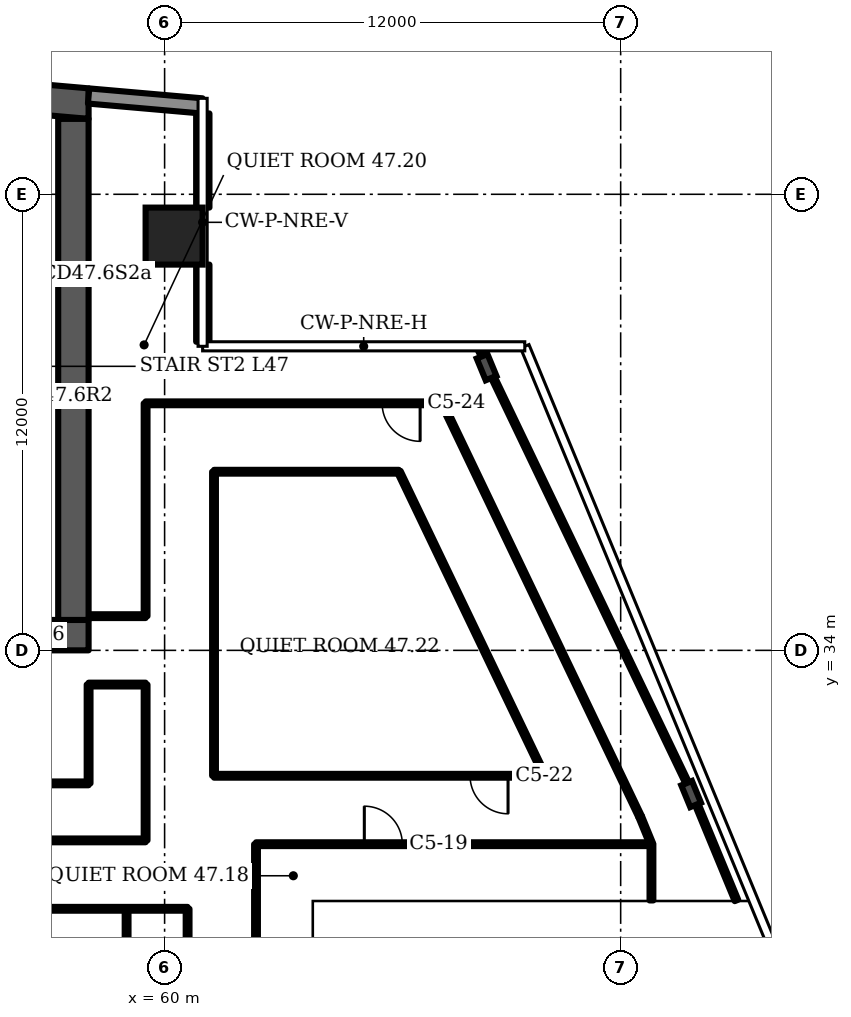
"""IFC4 building model, lengths in metres.
Left out: names, types, materials, properties, quantities, classifications, styles, units other than length and angle.
Written with IfcOpenShell. Run it as: python <this file> out.ifc"""

import sys

from ifc_helpers import new_model, si_unit, direction, frame, frame_2d, origin, origin_2d, place, context, subcontext, project, spatial, polyline, rectangle, i_section, outline, extrude, element, fill, save


model = new_model("IFC4")
c1 = context("Model", 3, precision=1e-05, world=origin(), true_north=direction((0.0, 1.0)))
c2 = subcontext(c1, "Body", "Model", "MODEL_VIEW")
j1 = project(units=[si_unit("LENGTHUNIT", "METRE"), si_unit("PLANEANGLEUNIT", "RADIAN")], contexts=[c1])
p1 = place(None, origin())
s1 = spatial("IfcSite", under=j1, at=p1, CompositionType="ELEMENT")
p2 = place(p1, origin())
s2 = spatial("IfcBuilding", under=s1, at=p2, CompositionType="ELEMENT")
p3 = place(p2, frame((0.0, 0.0, 191.5)))
s3 = spatial("IfcBuildingStorey", under=s2, at=p3, CompositionType="ELEMENT", Elevation=191.5)
p4 = place(p3, origin())
e1 = element("IfcWall", 1, at=p4, inside=s3, PredefinedType="SHEAR", context=c2, shape_type="SweptSolid", body=[
    extrude(outline(polyline([(16.0, 47.984), (37.0, 49.822), (58.0, 47.984), (58.0, 48.787), (37.0, 50.625), (16.0, 48.787), (16.0, 47.984)])), origin(), (0.0, 0.0, 1.0), 3.6),
])
p5 = place(p3, frame((16.0, 34.4, 0.0), z_axis=(0.0, 0.0, 1.0), x_axis=(1.0, 0.0, 0.0)))
e2 = element("IfcWall", 2, at=p5, inside=s3, PredefinedType="SHEAR", context=c2, shape_type="SweptSolid", body=[
    extrude(rectangle(XDim=42.0, YDim=0.8, at=frame_2d((21.0, 0.0))), origin(), (0.0, 0.0, 1.0), 3.6),
])
p6 = place(p5, frame((1.75, 0.0, 0.0)))
e3 = element("IfcOpeningElement", 3, at=p6, cuts=e2, PredefinedType="OPENING", context=c2, shape_type="SweptSolid", body=[
    extrude(rectangle(XDim=1.0, YDim=2.1, at=frame_2d((0.5, 1.05))), frame((0.0, 0.41, 0.0), z_axis=(0.0, -1.0, 0.0), x_axis=(1.0, 0.0, 0.0)), (0.0, 0.0, 1.0), 0.82),
])
p7 = place(p5, frame((4.65, 0.0, 0.0)))
e4 = element("IfcOpeningElement", 4, at=p7, cuts=e2, PredefinedType="OPENING", context=c2, shape_type="SweptSolid", body=[
    extrude(rectangle(XDim=1.0, YDim=2.1, at=frame_2d((0.5, 1.05))), frame((0.0, 0.41, 0.0), z_axis=(0.0, -1.0, 0.0), x_axis=(1.0, 0.0, 0.0)), (0.0, 0.0, 1.0), 0.82),
])
p8 = place(p5, frame((7.65, 0.0, 0.0)))
e5 = element("IfcOpeningElement", 5, at=p8, cuts=e2, PredefinedType="OPENING", context=c2, shape_type="SweptSolid", body=[
    extrude(rectangle(XDim=1.2, YDim=2.1, at=frame_2d((0.6, 1.05))), frame((0.0, 0.41, 0.0), z_axis=(0.0, -1.0, 0.0), x_axis=(1.0, 0.0, 0.0)), (0.0, 0.0, 1.0), 0.82),
])
p9 = place(p5, frame((14.767, 0.0, 0.0)))
e6 = element("IfcOpeningElement", 6, at=p9, cuts=e2, PredefinedType="OPENING", context=c2, shape_type="SweptSolid", body=[
    extrude(rectangle(XDim=1.1, YDim=2.1, at=frame_2d((0.55, 1.05))), frame((0.0, 0.41, 0.0), z_axis=(0.0, -1.0, 0.0), x_axis=(1.0, 0.0, 0.0)), (0.0, 0.0, 1.0), 0.82),
])
p10 = place(p5, frame((19.133, 0.0, 0.0)))
e7 = element("IfcOpeningElement", 7, at=p10, cuts=e2, PredefinedType="OPENING", context=c2, shape_type="SweptSolid", body=[
    extrude(rectangle(XDim=1.1, YDim=2.1, at=frame_2d((0.55, 1.05))), frame((0.0, 0.41, 0.0), z_axis=(0.0, -1.0, 0.0), x_axis=(1.0, 0.0, 0.0)), (0.0, 0.0, 1.0), 0.82),
])
p11 = place(p5, frame((16.8, 0.0, 0.0)))
e8 = element("IfcOpeningElement", 8, at=p11, cuts=e2, PredefinedType="OPENING", context=c2, shape_type="SweptSolid", body=[
    extrude(rectangle(XDim=1.4, YDim=2.1, at=frame_2d((0.7, 1.05))), frame((0.0, 0.41, 0.0), z_axis=(0.0, -1.0, 0.0), x_axis=(1.0, 0.0, 0.0)), (0.0, 0.0, 1.0), 0.82),
])
p12 = place(p5, frame((21.767, 0.0, 0.0)))
e9 = element("IfcOpeningElement", 9, at=p12, cuts=e2, PredefinedType="OPENING", context=c2, shape_type="SweptSolid", body=[
    extrude(rectangle(XDim=1.1, YDim=2.1, at=frame_2d((0.55, 1.05))), frame((0.0, 0.41, 0.0), z_axis=(0.0, -1.0, 0.0), x_axis=(1.0, 0.0, 0.0)), (0.0, 0.0, 1.0), 0.82),
])
p13 = place(p5, frame((23.95, 0.0, 0.0)))
e10 = element("IfcOpeningElement", 10, at=p13, cuts=e2, PredefinedType="OPENING", context=c2, shape_type="SweptSolid", body=[
    extrude(rectangle(XDim=1.1, YDim=2.1, at=frame_2d((0.55, 1.05))), frame((0.0, 0.41, 0.0), z_axis=(0.0, -1.0, 0.0), x_axis=(1.0, 0.0, 0.0)), (0.0, 0.0, 1.0), 0.82),
])
p14 = place(p5, frame((26.133, 0.0, 0.0)))
e11 = element("IfcOpeningElement", 11, at=p14, cuts=e2, PredefinedType="OPENING", context=c2, shape_type="SweptSolid", body=[
    extrude(rectangle(XDim=1.1, YDim=2.1, at=frame_2d((0.55, 1.05))), frame((0.0, 0.41, 0.0), z_axis=(0.0, -1.0, 0.0), x_axis=(1.0, 0.0, 0.0)), (0.0, 0.0, 1.0), 0.82),
])
p15 = place(p5, frame((33.15, 0.0, 0.0)))
e12 = element("IfcOpeningElement", 12, at=p15, cuts=e2, PredefinedType="OPENING", context=c2, shape_type="SweptSolid", body=[
    extrude(rectangle(XDim=1.2, YDim=2.1, at=frame_2d((0.6, 1.05))), frame((0.0, 0.41, 0.0), z_axis=(0.0, -1.0, 0.0), x_axis=(1.0, 0.0, 0.0)), (0.0, 0.0, 1.0), 0.82),
])
p16 = place(p5, frame((37.767, 0.0, 0.0)))
e13 = element("IfcOpeningElement", 13, at=p16, cuts=e2, PredefinedType="OPENING", context=c2, shape_type="SweptSolid", body=[
    extrude(rectangle(XDim=1.4, YDim=2.1, at=frame_2d((0.7, 1.05))), frame((0.0, 0.41, 0.0), z_axis=(0.0, -1.0, 0.0), x_axis=(1.0, 0.0, 0.0)), (0.0, 0.0, 1.0), 0.82),
])
p17 = place(p3, frame((57.6, 34.8, 0.0), z_axis=(0.0, 0.0, 1.0), x_axis=(0.0, 1.0, 0.0)))
e14 = element("IfcWall", 14, at=p17, inside=s3, PredefinedType="SHEAR", context=c2, shape_type="SweptSolid", body=[
    extrude(rectangle(XDim=13.184, YDim=0.8, at=frame_2d((6.592, 0.0))), origin(), (0.0, 0.0, 1.0), 3.6),
])
p18 = place(p3, frame((60.25, 44.9, 0.0), z_axis=(0.0, 0.0, 1.0), x_axis=(1.0, 0.0, 0.0)))
e15 = element("IfcColumn", 15, at=p18, inside=s3, PredefinedType="COLUMN", context=c2, shape_type="SweptSolid", body=[
    extrude(rectangle(XDim=1.5, YDim=1.5, at=origin_2d()), origin(), (0.0, 0.0, 1.0), 3.6),
])
for number, where, z_axis, x_axis in (
    (16, (73.854, 30.219, 0.0), (0.0, 0.0, 1.0), (0.924, 0.382, 0.0)),
    (17, (68.472, 41.45, 0.0), (0.0, 0.0, 1.0), (0.924, 0.382, 0.0)),
):
    element("IfcColumn", number, at=place(p3, frame(where, z_axis=z_axis, x_axis=x_axis)), inside=s3, PredefinedType="COLUMN", context=c2, shape_type="SweptSolid", body=[
        extrude(i_section(OverallWidth=0.305, OverallDepth=0.62, WebThickness=0.021, FlangeThickness=0.04, FilletRadius=0.027, at=origin_2d()), origin(), (0.0, 0.0, 1.0), 3.6),
    ])
p19 = place(p3, frame((60.983, 48.326, 0.0), z_axis=(0.0, 0.0, 1.0), x_axis=(-0.996194, 0.087168, 0.0)))
e18 = element("IfcWall", 18, at=p19, inside=s3, PredefinedType="SOLIDWALL", context=c2, shape_type="SweptSolid", body=[
    extrude(rectangle(XDim=2.994, YDim=0.4, at=frame_2d((1.497, 0.0))), origin(), (0.0, 0.0, 1.0), 3.2),
])
p20 = place(p3, frame((61.005, 42.12, 0.0), z_axis=(0.0, 0.0, 1.0), x_axis=(0.0, 1.0, 0.0)))
e19 = element("IfcWall", 19, at=p20, inside=s3, PredefinedType="SOLIDWALL", context=c2, shape_type="SweptSolid", body=[
    extrude(rectangle(XDim=2.03, YDim=0.35, at=frame_2d((1.015, 0.0))), origin(), (0.0, 0.0, 1.0), 1.0),
])
p21 = place(p3, frame((61.005, 45.65, 0.0), z_axis=(0.0, 0.0, 1.0), x_axis=(0.0, 1.0, 0.0)))
e20 = element("IfcWall", 20, at=p21, inside=s3, PredefinedType="SOLIDWALL", context=c2, shape_type="SweptSolid", body=[
    extrude(rectangle(XDim=2.477, YDim=0.35, at=frame_2d((1.238, 0.0))), origin(), (0.0, 0.0, 1.0), 1.0),
])
p22 = place(p3, frame((51.4, 40.7, 0.0), z_axis=(0.0, 0.0, 1.0), x_axis=(1.0, 0.0, 0.0)))
e21 = element("IfcWall", 21, at=p22, inside=s3, PredefinedType="PARTITIONING", context=c2, shape_type="SweptSolid", body=[
    extrude(rectangle(XDim=5.8, YDim=0.2, at=frame_2d((2.9, 0.0))), origin(), (0.0, 0.0, 1.0), 3.2),
])
p23 = place(p22, frame((0.367, 0.0, 0.0)))
e22 = element("IfcOpeningElement", 22, at=p23, cuts=e21, PredefinedType="OPENING", context=c2, shape_type="SweptSolid", body=[
    extrude(rectangle(XDim=1.1, YDim=2.1, at=frame_2d((0.55, 1.05))), frame((0.0, 0.11, 0.0), z_axis=(0.0, -1.0, 0.0), x_axis=(1.0, 0.0, 0.0)), (0.0, 0.0, 1.0), 0.22),
])
p24 = place(p22, frame((3.417, 0.0, 0.0)))
e23 = element("IfcOpeningElement", 23, at=p24, cuts=e21, PredefinedType="OPENING", context=c2, shape_type="SweptSolid", body=[
    extrude(rectangle(XDim=1.0, YDim=2.1, at=frame_2d((0.5, 1.05))), frame((0.0, 0.11, 0.0), z_axis=(0.0, -1.0, 0.0), x_axis=(1.0, 0.0, 0.0)), (0.0, 0.0, 1.0), 0.22),
])
p25 = place(p3, frame((51.4, 43.9, 0.0), z_axis=(0.0, 0.0, 1.0), x_axis=(1.0, 0.0, 0.0)))
e24 = element("IfcWall", 24, at=p25, inside=s3, PredefinedType="PARTITIONING", context=c2, shape_type="SweptSolid", body=[
    extrude(rectangle(XDim=5.8, YDim=0.2, at=frame_2d((2.9, 0.0))), origin(), (0.0, 0.0, 1.0), 3.2),
])
p26 = place(p25, frame((2.283, 0.0, 0.0)))
e25 = element("IfcOpeningElement", 25, at=p26, cuts=e24, PredefinedType="OPENING", context=c2, shape_type="SweptSolid", body=[
    extrude(rectangle(XDim=1.0, YDim=2.1, at=frame_2d((0.5, 1.05))), frame((0.0, 0.11, 0.0), z_axis=(0.0, -1.0, 0.0), x_axis=(1.0, 0.0, 0.0)), (0.0, 0.0, 1.0), 0.22),
])
p27 = place(p25, frame((4.167, 0.0, 0.0)))
e26 = element("IfcOpeningElement", 26, at=p27, cuts=e24, PredefinedType="OPENING", context=c2, shape_type="SweptSolid", body=[
    extrude(rectangle(XDim=1.0, YDim=2.1, at=frame_2d((0.5, 1.05))), frame((0.0, 0.11, 0.0), z_axis=(0.0, -1.0, 0.0), x_axis=(1.0, 0.0, 0.0)), (0.0, 0.0, 1.0), 0.22),
])
p28 = place(p3, frame((18.635, 29.0, 0.0), z_axis=(0.0, 0.0, 1.0), x_axis=(1.0, 0.0, 0.0)))
e27 = element("IfcWall", 27, at=p28, inside=s3, PredefinedType="PARTITIONING", context=c2, shape_type="SweptSolid", body=[
    extrude(rectangle(XDim=40.865, YDim=0.1, at=frame_2d((20.433, 0.0))), origin(), (0.0, 0.0, 1.0), 3.2),
])
p29 = place(p28, frame((30.545, 0.0, 0.0)))
e28 = element("IfcOpeningElement", 28, at=p29, cuts=e27, PredefinedType="OPENING", context=c2, shape_type="SweptSolid", body=[
    extrude(rectangle(XDim=1.0, YDim=2.1, at=frame_2d((0.5, 1.05))), frame((0.0, 0.06, 0.0), z_axis=(0.0, -1.0, 0.0), x_axis=(1.0, 0.0, 0.0)), (0.0, 0.0, 1.0), 0.12),
])
p30 = place(p3, frame((19.3, 27.2, 0.0), z_axis=(0.0, 0.0, 1.0), x_axis=(1.0, 0.0, 0.0)))
e29 = element("IfcWall", 29, at=p30, inside=s3, PredefinedType="PARTITIONING", context=c2, shape_type="SweptSolid", body=[
    extrude(rectangle(XDim=41.305, YDim=0.1, at=frame_2d((20.652, 0.0))), origin(), (0.0, 0.0, 1.0), 3.2),
])
p31 = place(p30, frame((32.32, 0.0, 0.0)))
e30 = element("IfcOpeningElement", 30, at=p31, cuts=e29, PredefinedType="OPENING", context=c2, shape_type="SweptSolid", body=[
    extrude(rectangle(XDim=1.8, YDim=2.1, at=frame_2d((0.9, 1.05))), frame((0.0, 0.06, 0.0), z_axis=(0.0, -1.0, 0.0), x_axis=(1.0, 0.0, 0.0)), (0.0, 0.0, 1.0), 0.12),
])
p32 = place(p3, frame((58.0, 30.5, 0.0), z_axis=(0.0, 0.0, 1.0), x_axis=(0.0, 1.0, 0.0)))
e31 = element("IfcWall", 31, at=p32, inside=s3, PredefinedType="PARTITIONING", context=c2, shape_type="SweptSolid", body=[
    extrude(rectangle(XDim=2.6, YDim=0.1, at=frame_2d((1.3, 0.0))), origin(), (0.0, 0.0, 1.0), 3.2),
])
p33 = place(p3, frame((58.0, 33.1, 0.0), z_axis=(0.0, 0.0, 1.0), x_axis=(1.0, 0.0, 0.0)))
e32 = element("IfcWall", 32, at=p33, inside=s3, PredefinedType="PARTITIONING", context=c2, shape_type="SweptSolid", body=[
    extrude(rectangle(XDim=1.5, YDim=0.1, at=frame_2d((0.75, 0.0))), origin(), (0.0, 0.0, 1.0), 3.2),
])
p34 = place(p3, frame((58.02, 34.9, 0.0), z_axis=(0.0, 0.0, 1.0), x_axis=(1.0, 0.0, 0.0)))
e33 = element("IfcWall", 33, at=p34, inside=s3, PredefinedType="PARTITIONING", context=c2, shape_type="SweptSolid", body=[
    extrude(rectangle(XDim=1.48, YDim=0.1, at=frame_2d((0.74, 0.0))), origin(), (0.0, 0.0, 1.0), 3.2),
])
p35 = place(p3, frame((59.0, 13.625, 0.0), z_axis=(0.0, 0.0, 1.0), x_axis=(0.0, 1.0, 0.0)))
e34 = element("IfcWall", 34, at=p35, inside=s3, PredefinedType="PARTITIONING", context=c2, shape_type="SweptSolid", body=[
    extrude(rectangle(XDim=13.575, YDim=0.1, at=frame_2d((6.788, 0.0))), origin(), (0.0, 0.0, 1.0), 3.2),
])
p36 = place(p3, frame((59.5, 29.0, 0.0), z_axis=(0.0, 0.0, 1.0), x_axis=(0.0, 1.0, 0.0)))
e35 = element("IfcWall", 35, at=p36, inside=s3, PredefinedType="PARTITIONING", context=c2, shape_type="SweptSolid", body=[
    extrude(rectangle(XDim=4.1, YDim=0.1, at=frame_2d((2.05, 0.0))), origin(), (0.0, 0.0, 1.0), 3.2),
])
p37 = place(p3, frame((59.5, 34.9, 0.0), z_axis=(0.0, 0.0, 1.0), x_axis=(0.0, 1.0, 0.0)))
e36 = element("IfcWall", 36, at=p37, inside=s3, PredefinedType="PARTITIONING", context=c2, shape_type="SweptSolid", body=[
    extrude(rectangle(XDim=5.6, YDim=0.1, at=frame_2d((2.8, 0.0))), origin(), (0.0, 0.0, 1.0), 3.2),
])
p38 = place(p3, frame((59.5, 40.5, 0.0), z_axis=(0.0, 0.0, 1.0), x_axis=(1.0, 0.0, 0.0)))
e37 = element("IfcWall", 37, at=p38, inside=s3, PredefinedType="PARTITIONING", context=c2, shape_type="SweptSolid", body=[
    extrude(rectangle(XDim=7.8, YDim=0.1, at=frame_2d((3.9, 0.0))), origin(), (0.0, 0.0, 1.0), 3.2),
])
p39 = place(p38, frame((6.223, 0.0, 0.0)))
e38 = element("IfcOpeningElement", 38, at=p39, cuts=e37, PredefinedType="OPENING", context=c2, shape_type="SweptSolid", body=[
    extrude(rectangle(XDim=1.0, YDim=2.1, at=frame_2d((0.5, 1.05))), frame((0.0, 0.06, 0.0), z_axis=(0.0, -1.0, 0.0), x_axis=(1.0, 0.0, 0.0)), (0.0, 0.0, 1.0), 0.12),
])
p40 = place(p3, frame((60.605, 17.1, 0.0), z_axis=(0.0, 0.0, 1.0), x_axis=(0.0, 1.0, 0.0)))
e39 = element("IfcWall", 39, at=p40, inside=s3, PredefinedType="PARTITIONING", context=c2, shape_type="SweptSolid", body=[
    extrude(rectangle(XDim=10.1, YDim=0.1, at=frame_2d((5.05, 0.0))), origin(), (0.0, 0.0, 1.0), 3.2),
])
p41 = place(p3, frame((61.3, 30.7, 0.0), z_axis=(0.0, 0.0, 1.0), x_axis=(0.0, 1.0, 0.0)))
e40 = element("IfcWall", 40, at=p41, inside=s3, PredefinedType="PARTITIONING", context=c2, shape_type="SweptSolid", body=[
    extrude(rectangle(XDim=8.0, YDim=0.1, at=frame_2d((4.0, 0.0))), origin(), (0.0, 0.0, 1.0), 3.2),
])
p42 = place(p3, frame((61.3, 30.7, 0.0), z_axis=(0.0, 0.0, 1.0), x_axis=(1.0, 0.0, 0.0)))
e41 = element("IfcWall", 41, at=p42, inside=s3, PredefinedType="PARTITIONING", context=c2, shape_type="SweptSolid", body=[
    extrude(rectangle(XDim=8.7, YDim=0.1, at=frame_2d((4.35, 0.0))), origin(), (0.0, 0.0, 1.0), 3.2),
])
p43 = place(p42, frame((6.737, 0.0, 0.0)))
e42 = element("IfcOpeningElement", 42, at=p43, cuts=e41, PredefinedType="OPENING", context=c2, shape_type="SweptSolid", body=[
    extrude(rectangle(XDim=1.0, YDim=2.1, at=frame_2d((0.5, 1.05))), frame((0.0, 0.06, 0.0), z_axis=(0.0, -1.0, 0.0), x_axis=(1.0, 0.0, 0.0)), (0.0, 0.0, 1.0), 0.12),
])
p44 = place(p3, frame((61.3, 38.7, 0.0), z_axis=(0.0, 0.0, 1.0), x_axis=(1.0, 0.0, 0.0)))
e43 = element("IfcWall", 43, at=p44, inside=s3, PredefinedType="PARTITIONING", context=c2, shape_type="SweptSolid", body=[
    extrude(rectangle(XDim=4.865, YDim=0.1, at=frame_2d((2.433, 0.0))), origin(), (0.0, 0.0, 1.0), 3.2),
])
p45 = place(p3, frame((62.405, 25.05, 0.0), z_axis=(0.0, 0.0, 1.0), x_axis=(0.0, 1.0, 0.0)))
e44 = element("IfcWall", 44, at=p45, inside=s3, PredefinedType="PARTITIONING", context=c2, shape_type="SweptSolid", body=[
    extrude(rectangle(XDim=3.85, YDim=0.1, at=frame_2d((1.925, 0.0))), origin(), (0.0, 0.0, 1.0), 3.2),
])
p46 = place(p3, frame((62.405, 28.9, 0.0), z_axis=(0.0, 0.0, 1.0), x_axis=(1.0, 0.0, 0.0)))
e45 = element("IfcWall", 45, at=p46, inside=s3, PredefinedType="PARTITIONING", context=c2, shape_type="SweptSolid", body=[
    extrude(rectangle(XDim=10.405, YDim=0.1, at=frame_2d((5.203, 0.0))), origin(), (0.0, 0.0, 1.0), 3.2),
])
p47 = place(p46, frame((2.85, 0.0, 0.0)))
e46 = element("IfcOpeningElement", 46, at=p47, cuts=e45, PredefinedType="OPENING", context=c2, shape_type="SweptSolid", body=[
    extrude(rectangle(XDim=1.0, YDim=2.1, at=frame_2d((0.5, 1.05))), frame((0.0, 0.06, 0.0), z_axis=(0.0, -1.0, 0.0), x_axis=(1.0, 0.0, 0.0)), (0.0, 0.0, 1.0), 0.12),
])
p48 = place(p3, frame((70.0, 30.7, 0.0), z_axis=(0.0, 0.0, 1.0), x_axis=(-0.432271, 0.901748, 0.0)))
e47 = element("IfcWall", 47, at=p48, inside=s3, PredefinedType="PARTITIONING", context=c2, shape_type="SweptSolid", body=[
    extrude(rectangle(XDim=8.872, YDim=0.1, at=frame_2d((4.436, 0.0))), origin(), (0.0, 0.0, 1.0), 3.2),
])
p49 = place(p3, frame((72.515, 29.62, 0.0), z_axis=(0.0, 0.0, 1.0), x_axis=(-0.43171, 0.902012, 0.0)))
e48 = element("IfcWall", 48, at=p49, inside=s3, PredefinedType="PARTITIONING", context=c2, shape_type="SweptSolid", body=[
    extrude(rectangle(XDim=12.007, YDim=0.1, at=frame_2d((6.003, 0.0))), origin(), (0.0, 0.0, 1.0), 3.2),
])
p50 = place(p3, frame((72.81, 28.9, 0.0), z_axis=(0.0, 0.0, 1.0), x_axis=(-0.379219, 0.925307, 0.0)))
e49 = element("IfcWall", 49, at=p50, inside=s3, PredefinedType="PARTITIONING", context=c2, shape_type="SweptSolid", body=[
    extrude(rectangle(XDim=0.778, YDim=0.1, at=frame_2d((0.389, 0.0))), origin(), (0.0, 0.0, 1.0), 3.2),
])
p51 = place(p3, frame((72.81, 27.42, 0.0), z_axis=(0.0, 0.0, 1.0), x_axis=(0.0, 1.0, 0.0)))
e50 = element("IfcWall", 50, at=p51, inside=s3, PredefinedType="PARTITIONING", context=c2, shape_type="SweptSolid", body=[
    extrude(rectangle(XDim=1.48, YDim=0.1, at=frame_2d((0.74, 0.0))), origin(), (0.0, 0.0, 1.0), 3.2),
])
p52 = place(p3, frame((73.885, 30.23, 0.0), z_axis=(0.0, 0.0, 1.0), x_axis=(-0.432032, 0.901863, 0.0)))
e51 = element("IfcWall", 51, at=p52, inside=s3, PredefinedType="PARTITIONING", context=c2, shape_type="SweptSolid", body=[
    extrude(rectangle(XDim=13.015, YDim=0.1, at=frame_2d((6.507, 0.0))), origin(), (0.0, 0.0, 1.0), 3.2),
])
p53 = place(p3, frame((75.047, 27.42, 0.0), z_axis=(0.0, 0.0, 1.0), x_axis=(-0.382024, 0.924148, 0.0)))
e52 = element("IfcWall", 52, at=p53, inside=s3, PredefinedType="PARTITIONING", context=c2, shape_type="SweptSolid", body=[
    extrude(rectangle(XDim=3.041, YDim=0.1, at=frame_2d((1.521, 0.0))), origin(), (0.0, 0.0, 1.0), 2.58),
])
p54 = place(p3, frame((44.15, 30.5, 0.0), z_axis=(0.0, 0.0, 1.0), x_axis=(1.0, 0.0, 0.0)))
e53 = element("IfcWall", 53, at=p54, inside=s3, PredefinedType="PARTITIONING", context=c2, shape_type="SweptSolid", body=[
    extrude(rectangle(XDim=13.85, YDim=0.1, at=frame_2d((6.925, 0.0))), origin(), (0.0, 0.0, 1.0), 3.2),
])
p55 = place(p47, origin())
e54 = element("IfcDoor", 54, at=p55, inside=s3, OperationType="SINGLE_SWING_LEFT", PredefinedType="DOOR", context=c2, shape_type="SweptSolid", body=[
    extrude(rectangle(XDim=1.0, YDim=2.1, at=frame_2d((0.5, 1.05))), frame((0.0, 0.025, 0.0), z_axis=(0.0, -1.0, 0.0), x_axis=(1.0, 0.0, 0.0)), (0.0, 0.0, 1.0), 0.05),
])
fill(e46, e54)
p56 = place(p43, origin())
e55 = element("IfcDoor", 55, at=p56, inside=s3, OperationType="SINGLE_SWING_RIGHT", PredefinedType="DOOR", context=c2, shape_type="SweptSolid", body=[
    extrude(rectangle(XDim=1.0, YDim=2.1, at=frame_2d((0.5, 1.05))), frame((0.0, 0.025, 0.0), z_axis=(0.0, -1.0, 0.0), x_axis=(1.0, 0.0, 0.0)), (0.0, 0.0, 1.0), 0.05),
])
fill(e42, e55)
p57 = place(p39, origin())
e56 = element("IfcDoor", 56, at=p57, inside=s3, OperationType="SINGLE_SWING_RIGHT", PredefinedType="DOOR", context=c2, shape_type="SweptSolid", body=[
    extrude(rectangle(XDim=1.0, YDim=2.1, at=frame_2d((0.5, 1.05))), frame((0.0, 0.025, 0.0), z_axis=(0.0, -1.0, 0.0), x_axis=(1.0, 0.0, 0.0)), (0.0, 0.0, 1.0), 0.05),
])
fill(e38, e56)
save(model, sys.argv[1])
